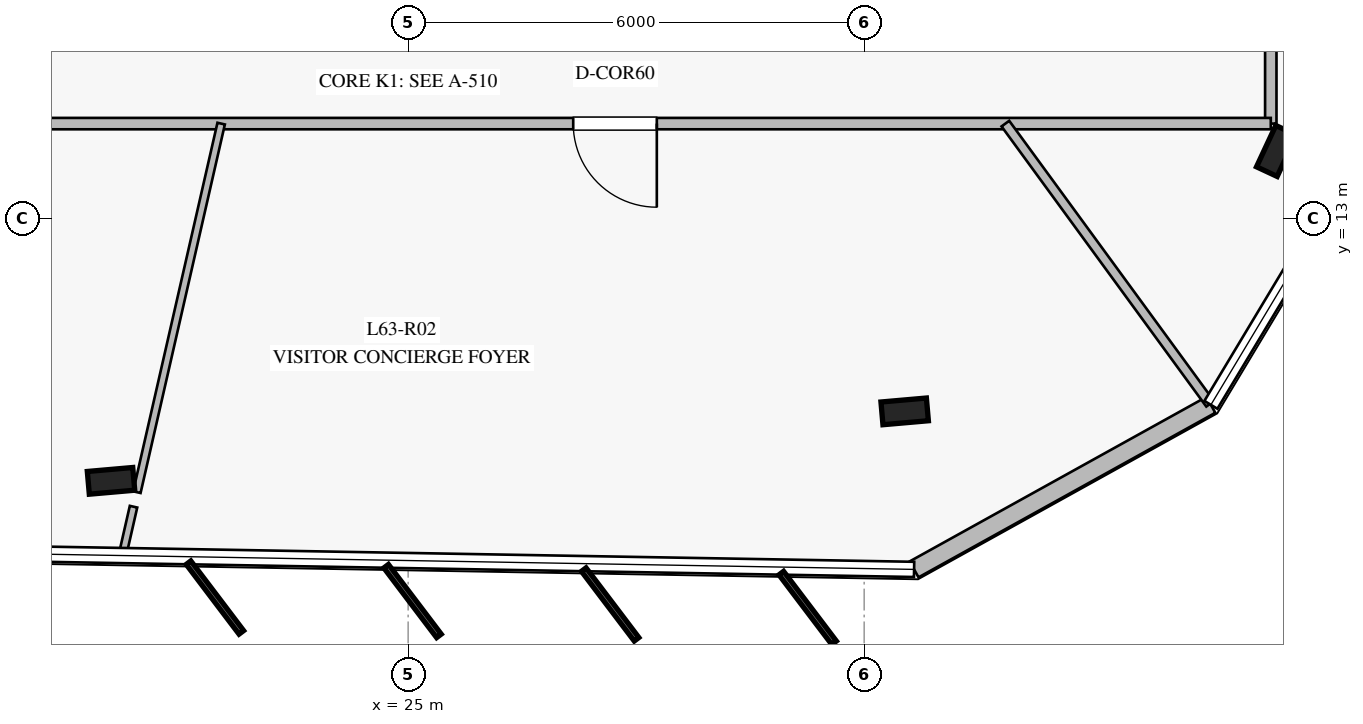
"""IFC4 building model, lengths in metres.
Left out: names, types, materials, properties, quantities, classifications, styles, units other than length and angle.
Written with IfcOpenShell. Run it as: python <this file> out.ifc"""

import sys

from ifc_helpers import new_model, si_unit, direction, frame, frame_2d, origin, origin_2d, place, context, subcontext, project, spatial, rectangle, i_section, extrude, element, fill, save


model = new_model("IFC4")
c1 = context("Model", 3, precision=1e-05, world=origin(), true_north=direction((0.0, 1.0)))
c2 = subcontext(c1, "Body", "Model", "MODEL_VIEW")
j1 = project(units=[si_unit("LENGTHUNIT", "METRE"), si_unit("PLANEANGLEUNIT", "RADIAN")], contexts=[c1])
p1 = place(None, origin())
s1 = spatial("IfcSite", under=j1, at=p1, CompositionType="ELEMENT")
p2 = place(p1, origin())
s2 = spatial("IfcBuilding", under=s1, at=p2, CompositionType="ELEMENT")
p3 = place(p2, frame((0.0, 0.0, 262.2)))
s3 = spatial("IfcBuildingStorey", under=s2, at=p3, CompositionType="ELEMENT", Elevation=262.2)
for number, where, z_axis, x_axis in (
    (1, (21.091, 9.55, 0.0), (0.0, 0.0, 1.0), (0.996, 0.087, 0.0)),
    (2, (31.533, 10.464, 0.0), (0.0, 0.0, 1.0), (0.996, 0.087, 0.0)),
    (3, (36.425, 13.89, 0.0), (0.0, 0.0, 1.0), (0.423, 0.906, 0.0)),
):
    element("IfcColumn", number, at=place(p3, frame(where, z_axis=z_axis, x_axis=x_axis)), inside=s3, PredefinedType="COLUMN", context=c2, shape_type="SweptSolid", body=[
        extrude(i_section(OverallWidth=0.3, OverallDepth=0.6, WebThickness=0.015, FlangeThickness=0.03, at=origin_2d()), origin(), (0.0, 0.0, 1.0), 4.0),
    ])
p4 = place(p3, frame((31.657, 8.385, 0.0), z_axis=(0.0, 0.0, 1.0), x_axis=(0.874577351509, 0.484886023956, 0.0)))
e4 = element("IfcWall", 4, at=p4, inside=s3, PredefinedType="STANDARD", context=c2, shape_type="SweptSolid", body=[
    extrude(rectangle(XDim=4.465, YDim=0.24, at=frame_2d((2.232, 0.0))), origin(), (0.0, 0.0, 1.0), 3.78),
])
p5 = place(p3, frame((36.35, 35.75, 0.0), z_axis=(0.0, 0.0, 1.0), x_axis=(0.0, -1.0, 0.0)))
e5 = element("IfcWall", 5, at=p5, inside=s3, PredefinedType="PARTITIONING", context=c2, shape_type="SweptSolid", body=[
    extrude(rectangle(XDim=21.5, YDim=0.15, at=frame_2d((10.75, 0.0))), origin(), (0.0, 0.0, 1.0), 3.02),
])
p6 = place(p5, frame((14.686, 0.0, 0.0)))
e6 = element("IfcOpeningElement", 6, at=p6, cuts=e5, PredefinedType="OPENING", context=c2, shape_type="SweptSolid", body=[
    extrude(rectangle(XDim=1.1, YDim=2.2, at=frame_2d((0.55, 1.1))), frame((0.0, 0.085, 0.0), z_axis=(0.0, -1.0, 0.0), x_axis=(1.0, 0.0, 0.0)), (0.0, 0.0, 1.0), 0.17),
])
p7 = place(p3, frame((36.35, 14.25, 0.0), z_axis=(0.0, 0.0, 1.0), x_axis=(-1.0, 0.0, 0.0)))
e7 = element("IfcWall", 7, at=p7, inside=s3, PredefinedType="PARTITIONING", context=c2, shape_type="SweptSolid", body=[
    extrude(rectangle(XDim=22.7, YDim=0.15, at=frame_2d((11.35, 0.0))), origin(), (0.0, 0.0, 1.0), 3.28),
])
p8 = place(p7, frame((17.53, 0.0, 0.0)))
e8 = element("IfcOpeningElement", 8, at=p8, cuts=e7, PredefinedType="OPENING", context=c2, shape_type="SweptSolid", body=[
    extrude(rectangle(XDim=1.1, YDim=2.2, at=frame_2d((0.55, 1.1))), frame((0.0, 0.085, 0.0), z_axis=(0.0, -1.0, 0.0), x_axis=(1.0, 0.0, 0.0)), (0.0, 0.0, 1.0), 0.17),
])
p9 = place(p7, frame((8.078, 0.0, 0.0)))
e9 = element("IfcOpeningElement", 9, at=p9, cuts=e7, PredefinedType="OPENING", context=c2, shape_type="SweptSolid", body=[
    extrude(rectangle(XDim=1.1, YDim=2.2, at=frame_2d((0.55, 1.1))), frame((0.0, 0.085, 0.0), z_axis=(0.0, -1.0, 0.0), x_axis=(1.0, 0.0, 0.0)), (0.0, 0.0, 1.0), 0.17),
])
p10 = place(p3, frame((22.54, 14.25, 0.0), z_axis=(0.0, 0.0, 1.0), x_axis=(-0.222970058827, -0.97482529351, 0.0)))
e10 = element("IfcWall", 10, at=p10, inside=s3, PredefinedType="MOVABLE", context=c2, shape_type="SweptSolid", body=[
    extrude(rectangle(XDim=4.974, YDim=0.1, at=frame_2d((2.487, 0.0))), origin(), (0.0, 0.0, 1.0), 3.28),
])
p11 = place(p3, frame((21.387, 9.21, 0.0), z_axis=(0.0, 0.0, 1.0), x_axis=(-0.222474296585, -0.974938555684, 0.0)))
e11 = element("IfcWall", 11, at=p11, inside=s3, PredefinedType="MOVABLE", context=c2, shape_type="SweptSolid", body=[
    extrude(rectangle(XDim=0.643, YDim=0.1, at=frame_2d((0.322, 0.0))), origin(), (0.0, 0.0, 1.0), 3.78),
])
p12 = place(p3, frame((32.858, 14.25, 0.0), z_axis=(0.0, 0.0, 1.0), x_axis=(0.590080941399, -0.807344091821, 0.0)))
e12 = element("IfcWall", 12, at=p12, inside=s3, PredefinedType="PARTITIONING", context=c2, shape_type="SweptSolid", body=[
    extrude(rectangle(XDim=4.566, YDim=0.125, at=frame_2d((2.283, 0.0))), origin(), (0.0, 0.0, 1.0), 3.28),
])
p13 = place(p9, origin())
e13 = element("IfcDoor", 13, at=p13, inside=s3, OperationType="SINGLE_SWING_LEFT", PredefinedType="DOOR", context=c2, shape_type="SweptSolid", body=[
    extrude(rectangle(XDim=1.1, YDim=2.2, at=frame_2d((0.55, 1.1))), frame((0.0, 0.025, 0.0), z_axis=(0.0, -1.0, 0.0), x_axis=(1.0, 0.0, 0.0)), (0.0, 0.0, 1.0), 0.05),
])
fill(e9, e13)
save(model, sys.argv[1])
